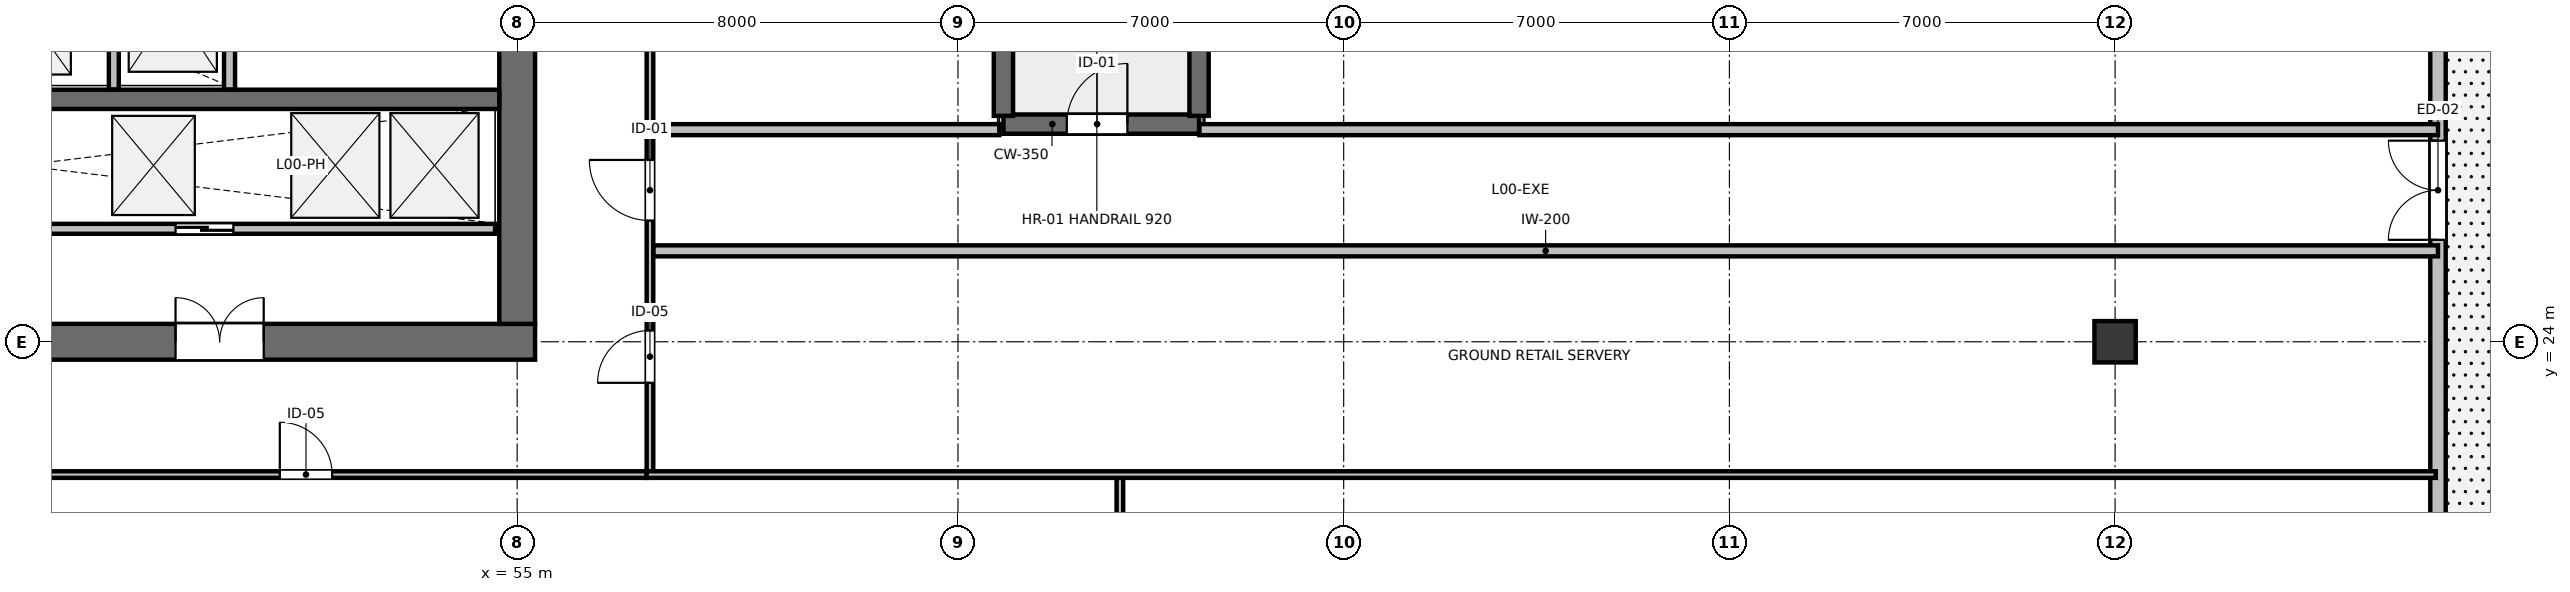
"""IFC4 building model, lengths in metres.
Left out: names, types, materials, properties, quantities, classifications, styles, units other than length and angle.
Written with IfcOpenShell. Run it as: python <this file> out.ifc"""

import sys

from ifc_helpers import new_model, si_unit, direction, frame, frame_2d, origin, origin_2d, place, context, subcontext, project, spatial, rectangle, extrude, element, fill, save


model = new_model("IFC4")
c1 = context("Model", 3, precision=1e-05, world=origin(), true_north=direction((0.0, 1.0)))
c2 = subcontext(c1, "Body", "Model", "MODEL_VIEW")
j1 = project(units=[si_unit("LENGTHUNIT", "METRE"), si_unit("PLANEANGLEUNIT", "RADIAN")], contexts=[c1])
p1 = place(None, origin())
s1 = spatial("IfcSite", under=j1, at=p1, CompositionType="ELEMENT")
p2 = place(p1, origin())
s2 = spatial("IfcBuilding", under=s1, at=p2, CompositionType="ELEMENT")
p3 = place(p2, origin())
s3 = spatial("IfcBuildingStorey", under=s2, at=p3, CompositionType="ELEMENT", Elevation=0.0)
p4 = place(p3, frame((36.675, 24.0, 0.0), z_axis=(0.0, 0.0, 1.0), x_axis=(1.0, 0.0, 0.0)))
e1 = element("IfcWall", 1, at=p4, inside=s3, PredefinedType="SHEAR", context=c2, shape_type="SweptSolid", body=[
    extrude(rectangle(XDim=18.65, YDim=0.65, at=frame_2d((9.325, 0.0))), origin(), (0.0, 0.0, 1.0), 4.72),
])
p5 = place(p4, frame((5.725, 0.0, 0.0)))
e2 = element("IfcOpeningElement", 2, at=p5, cuts=e1, PredefinedType="OPENING", context=c2, shape_type="SweptSolid", body=[
    extrude(rectangle(XDim=1.6, YDim=2.15, at=frame_2d((0.8, 1.075))), frame((0.0, 0.335, 0.0), z_axis=(0.0, -1.0, 0.0), x_axis=(1.0, 0.0, 0.0)), (0.0, 0.0, 1.0), 0.67),
])
p6 = place(p4, frame((12.125, 0.0, 0.0)))
e3 = element("IfcOpeningElement", 3, at=p6, cuts=e1, PredefinedType="OPENING", context=c2, shape_type="SweptSolid", body=[
    extrude(rectangle(XDim=1.6, YDim=2.15, at=frame_2d((0.8, 1.075))), frame((0.0, 0.335, 0.0), z_axis=(0.0, -1.0, 0.0), x_axis=(1.0, 0.0, 0.0)), (0.0, 0.0, 1.0), 0.67),
])
p7 = place(p3, frame((55.0, 24.325, 0.0), z_axis=(0.0, 0.0, 1.0), x_axis=(0.0, 1.0, 0.0)))
e4 = element("IfcWall", 4, at=p7, inside=s3, PredefinedType="SHEAR", context=c2, shape_type="SweptSolid", body=[
    extrude(rectangle(XDim=15.35, YDim=0.65, at=frame_2d((7.675, 0.0))), origin(), (0.0, 0.0, 1.0), 4.72),
])
p8 = place(p7, frame((5.2, 0.0, 0.0)))
e5 = element("IfcOpeningElement", 5, at=p8, cuts=e4, PredefinedType="OPENING", context=c2, shape_type="SweptSolid", body=[
    extrude(rectangle(XDim=1.15, YDim=2.15, at=frame_2d((0.575, 1.075))), frame((0.0, 0.335, 0.0), z_axis=(0.0, -1.0, 0.0), x_axis=(1.0, 0.0, 0.0)), (0.0, 0.0, 1.0), 0.67),
])
p9 = place(p3, frame((37.325, 28.4, 0.0), z_axis=(0.0, 0.0, 1.0), x_axis=(1.0, 0.0, 0.0)))
e6 = element("IfcWall", 6, at=p9, inside=s3, PredefinedType="SHEAR", context=c2, shape_type="SweptSolid", body=[
    extrude(rectangle(XDim=17.35, YDim=0.35, at=frame_2d((8.675, 0.0))), origin(), (0.0, 0.0, 1.0), 4.72),
])
p10 = place(p3, frame((89.86, 6.36, 0.0), z_axis=(0.0, 0.0, 1.0), x_axis=(0.0, 1.0, 0.0)))
e7 = element("IfcWall", 7, at=p10, inside=s3, PredefinedType="STANDARD", context=c2, shape_type="SweptSolid", body=[
    extrude(rectangle(XDim=51.28, YDim=0.28, at=frame_2d((25.64, 0.0))), origin(), (0.0, 0.0, 1.0), 4.72),
])
p11 = place(p10, frame((19.49, 0.0, 0.0)))
e8 = element("IfcOpeningElement", 8, at=p11, cuts=e7, PredefinedType="OPENING", context=c2, shape_type="SweptSolid", body=[
    extrude(rectangle(XDim=1.8, YDim=2.4, at=frame_2d((0.9, 1.2))), frame((0.0, 0.15, 0.0), z_axis=(0.0, -1.0, 0.0), x_axis=(1.0, 0.0, 0.0)), (0.0, 0.0, 1.0), 0.3),
])
p12 = place(p10, frame((37.19, 0.0, 0.0)))
e9 = element("IfcOpeningElement", 9, at=p12, cuts=e7, PredefinedType="OPENING", context=c2, shape_type="SweptSolid", body=[
    extrude(rectangle(XDim=3.6, YDim=3.6, at=frame_2d((1.8, 1.8))), frame((0.0, 0.15, 0.0), z_axis=(0.0, -1.0, 0.0), x_axis=(1.0, 0.0, 0.0)), (0.0, 0.0, 1.0), 0.3),
])
p13 = place(p10, frame((1.788, 0.0, 0.85)))
e10 = element("IfcOpeningElement", 10, at=p13, cuts=e7, PredefinedType="OPENING", context=c2, shape_type="SweptSolid", body=[
    extrude(rectangle(XDim=2.4, YDim=2.4, at=frame_2d((1.2, 1.2))), frame((0.0, 0.15, 0.0), z_axis=(0.0, -1.0, 0.0), x_axis=(1.0, 0.0, 0.0)), (0.0, 0.0, 1.0), 0.3),
])
p14 = place(p10, frame((5.563, 0.0, 0.85)))
e11 = element("IfcOpeningElement", 11, at=p14, cuts=e7, PredefinedType="OPENING", context=c2, shape_type="SweptSolid", body=[
    extrude(rectangle(XDim=2.4, YDim=2.4, at=frame_2d((1.2, 1.2))), frame((0.0, 0.15, 0.0), z_axis=(0.0, -1.0, 0.0), x_axis=(1.0, 0.0, 0.0)), (0.0, 0.0, 1.0), 0.3),
])
p15 = place(p10, frame((9.338, 0.0, 0.85)))
e12 = element("IfcOpeningElement", 12, at=p15, cuts=e7, PredefinedType="OPENING", context=c2, shape_type="SweptSolid", body=[
    extrude(rectangle(XDim=2.4, YDim=2.4, at=frame_2d((1.2, 1.2))), frame((0.0, 0.15, 0.0), z_axis=(0.0, -1.0, 0.0), x_axis=(1.0, 0.0, 0.0)), (0.0, 0.0, 1.0), 0.3),
])
p16 = place(p10, frame((43.317, 0.0, 0.85)))
e13 = element("IfcOpeningElement", 13, at=p16, cuts=e7, PredefinedType="OPENING", context=c2, shape_type="SweptSolid", body=[
    extrude(rectangle(XDim=2.4, YDim=2.4, at=frame_2d((1.2, 1.2))), frame((0.0, 0.15, 0.0), z_axis=(0.0, -1.0, 0.0), x_axis=(1.0, 0.0, 0.0)), (0.0, 0.0, 1.0), 0.3),
])
p17 = place(p10, frame((47.092, 0.0, 0.85)))
e14 = element("IfcOpeningElement", 14, at=p17, cuts=e7, PredefinedType="OPENING", context=c2, shape_type="SweptSolid", body=[
    extrude(rectangle(XDim=2.4, YDim=2.4, at=frame_2d((1.2, 1.2))), frame((0.0, 0.15, 0.0), z_axis=(0.0, -1.0, 0.0), x_axis=(1.0, 0.0, 0.0)), (0.0, 0.0, 1.0), 0.3),
])
p18 = place(p3, frame((49.78, 28.58, 0.0), z_axis=(0.0, 0.0, 1.0), x_axis=(0.0, 1.0, 0.0)))
e15 = element("IfcWall", 15, at=p18, inside=s3, PredefinedType="PARTITIONING", context=c2, shape_type="SweptSolid", body=[
    extrude(rectangle(XDim=3.04, YDim=0.2, at=frame_2d((1.52, 0.0))), origin(), (0.0, 0.0, 1.0), 4.72),
])
p19 = place(p18, frame((0.95, 0.0, 0.0)))
e16 = element("IfcOpeningElement", 16, at=p19, cuts=e15, PredefinedType="OPENING", context=c2, shape_type="SweptSolid", body=[
    extrude(rectangle(XDim=1.05, YDim=2.15, at=frame_2d((0.525, 1.075))), frame((0.0, 0.11, 0.0), z_axis=(0.0, -1.0, 0.0), x_axis=(1.0, 0.0, 0.0)), (0.0, 0.0, 1.0), 0.22),
])
p20 = place(p3, frame((47.68, 28.58, 0.0), z_axis=(0.0, 0.0, 1.0), x_axis=(0.0, 1.0, 0.0)))
e17 = element("IfcWall", 17, at=p20, inside=s3, PredefinedType="PARTITIONING", context=c2, shape_type="SweptSolid", body=[
    extrude(rectangle(XDim=3.04, YDim=0.18, at=frame_2d((1.52, 0.0))), origin(), (0.0, 0.0, 1.0), 4.72),
])
p21 = place(p3, frame((37.4, 26.05, 0.0), z_axis=(0.0, 0.0, 1.0), x_axis=(1.0, 0.0, 0.0)))
e18 = element("IfcWall", 18, at=p21, inside=s3, PredefinedType="PARTITIONING", context=c2, shape_type="SweptSolid", body=[
    extrude(rectangle(XDim=17.2, YDim=0.18, at=frame_2d((8.6, 0.0))), origin(), (0.0, 0.0, 1.0), 4.72),
])
p22 = place(p21, frame((1.1, 0.0, 0.0)))
e19 = element("IfcOpeningElement", 19, at=p22, cuts=e18, PredefinedType="OPENING", context=c2, shape_type="SweptSolid", body=[
    extrude(rectangle(XDim=1.05, YDim=2.15, at=frame_2d((0.525, 1.075))), frame((0.0, 0.1, 0.0), z_axis=(0.0, -1.0, 0.0), x_axis=(1.0, 0.0, 0.0)), (0.0, 0.0, 1.0), 0.2),
])
p23 = place(p21, frame((3.0, 0.0, 0.0)))
e20 = element("IfcOpeningElement", 20, at=p23, cuts=e18, PredefinedType="OPENING", context=c2, shape_type="SweptSolid", body=[
    extrude(rectangle(XDim=1.05, YDim=2.15, at=frame_2d((0.525, 1.075))), frame((0.0, 0.1, 0.0), z_axis=(0.0, -1.0, 0.0), x_axis=(1.0, 0.0, 0.0)), (0.0, 0.0, 1.0), 0.2),
])
p24 = place(p21, frame((11.4, 0.0, 0.0)))
e21 = element("IfcOpeningElement", 21, at=p24, cuts=e18, PredefinedType="OPENING", context=c2, shape_type="SweptSolid", body=[
    extrude(rectangle(XDim=1.05, YDim=2.15, at=frame_2d((0.525, 1.075))), frame((0.0, 0.1, 0.0), z_axis=(0.0, -1.0, 0.0), x_axis=(1.0, 0.0, 0.0)), (0.0, 0.0, 1.0), 0.2),
])
p25 = place(p3, frame((57.47, 25.65, 0.0), z_axis=(0.0, 0.0, 1.0), x_axis=(1.0, 0.0, 0.0)))
e22 = element("IfcWall", 22, at=p25, inside=s3, PredefinedType="PARTITIONING", context=c2, shape_type="SweptSolid", body=[
    extrude(rectangle(XDim=32.39, YDim=0.2, at=frame_2d((16.195, 0.0))), origin(), (0.0, 0.0, 1.0), 4.72),
])
p26 = place(p3, frame((57.47, 27.85, 0.0), z_axis=(0.0, 0.0, 1.0), x_axis=(1.0, 0.0, 0.0)))
e23 = element("IfcWall", 23, at=p26, inside=s3, PredefinedType="PARTITIONING", context=c2, shape_type="SweptSolid", body=[
    extrude(rectangle(XDim=6.28, YDim=0.2, at=frame_2d((3.14, 0.0))), origin(), (0.0, 0.0, 1.0), 4.72),
])
p27 = place(p3, frame((67.38, 27.85, 0.0), z_axis=(0.0, 0.0, 1.0), x_axis=(1.0, 0.0, 0.0)))
e24 = element("IfcWall", 24, at=p27, inside=s3, PredefinedType="PARTITIONING", context=c2, shape_type="SweptSolid", body=[
    extrude(rectangle(XDim=22.48, YDim=0.2, at=frame_2d((11.24, 0.0))), origin(), (0.0, 0.0, 1.0), 4.72),
])
p28 = place(p3, frame((65.938, 21.59, 0.0), z_axis=(0.0, 0.0, 1.0), x_axis=(0.0, -1.0, 0.0)))
e25 = element("IfcWall", 25, at=p28, inside=s3, PredefinedType="PARTITIONING", context=c2, shape_type="SweptSolid", body=[
    extrude(rectangle(XDim=19.41, YDim=0.12, at=frame_2d((9.705, 0.0))), origin(), (0.0, 0.0, 1.0), 3.82),
])
p29 = place(p28, frame((1.4, 0.0, 0.0)))
e26 = element("IfcOpeningElement", 26, at=p29, cuts=e25, PredefinedType="OPENING", context=c2, shape_type="SweptSolid", body=[
    extrude(rectangle(XDim=0.9, YDim=2.15, at=frame_2d((0.45, 1.075))), frame((0.0, 0.07, 0.0), z_axis=(0.0, -1.0, 0.0), x_axis=(1.0, 0.0, 0.0)), (0.0, 0.0, 1.0), 0.14),
])
p30 = place(p3, frame((34.65, 21.59, 0.0), z_axis=(0.0, 0.0, 1.0), x_axis=(1.0, 0.0, 0.0)))
e27 = element("IfcWall", 27, at=p30, inside=s3, PredefinedType="PARTITIONING", context=c2, shape_type="SweptSolid", body=[
    extrude(rectangle(XDim=22.7, YDim=0.12, at=frame_2d((11.35, 0.0))), origin(), (0.0, 0.0, 1.0), 3.82),
])
p31 = place(p30, frame((4.833, 0.0, 0.0)))
e28 = element("IfcOpeningElement", 28, at=p31, cuts=e27, PredefinedType="OPENING", context=c2, shape_type="SweptSolid", body=[
    extrude(rectangle(XDim=0.95, YDim=2.15, at=frame_2d((0.475, 1.075))), frame((0.0, 0.07, 0.0), z_axis=(0.0, -1.0, 0.0), x_axis=(1.0, 0.0, 0.0)), (0.0, 0.0, 1.0), 0.14),
])
p32 = place(p30, frame((16.042, 0.0, 0.0)))
e29 = element("IfcOpeningElement", 29, at=p32, cuts=e27, PredefinedType="OPENING", context=c2, shape_type="SweptSolid", body=[
    extrude(rectangle(XDim=0.95, YDim=2.15, at=frame_2d((0.475, 1.075))), frame((0.0, 0.07, 0.0), z_axis=(0.0, -1.0, 0.0), x_axis=(1.0, 0.0, 0.0)), (0.0, 0.0, 1.0), 0.14),
])
p33 = place(p3, frame((57.41, 21.65, 0.0), z_axis=(0.0, 0.0, 1.0), x_axis=(0.0, 1.0, 0.0)))
e30 = element("IfcWall", 30, at=p33, inside=s3, PredefinedType="PARTITIONING", context=c2, shape_type="SweptSolid", body=[
    extrude(rectangle(XDim=20.7, YDim=0.12, at=frame_2d((10.35, 0.0))), origin(), (0.0, 0.0, 1.0), 3.82),
])
p34 = place(p33, frame((1.605, 0.0, 0.0)))
e31 = element("IfcOpeningElement", 31, at=p34, cuts=e30, PredefinedType="OPENING", context=c2, shape_type="SweptSolid", body=[
    extrude(rectangle(XDim=0.95, YDim=2.15, at=frame_2d((0.475, 1.075))), frame((0.0, 0.07, 0.0), z_axis=(0.0, -1.0, 0.0), x_axis=(1.0, 0.0, 0.0)), (0.0, 0.0, 1.0), 0.14),
])
p35 = place(p33, frame((8.379, 0.0, 0.0)))
e32 = element("IfcOpeningElement", 32, at=p35, cuts=e30, PredefinedType="OPENING", context=c2, shape_type="SweptSolid", body=[
    extrude(rectangle(XDim=0.95, YDim=2.15, at=frame_2d((0.475, 1.075))), frame((0.0, 0.07, 0.0), z_axis=(0.0, -1.0, 0.0), x_axis=(1.0, 0.0, 0.0)), (0.0, 0.0, 1.0), 0.14),
])
p36 = place(p33, frame((15.459, 0.0, 0.0)))
e33 = element("IfcOpeningElement", 33, at=p36, cuts=e30, PredefinedType="OPENING", context=c2, shape_type="SweptSolid", body=[
    extrude(rectangle(XDim=0.95, YDim=2.15, at=frame_2d((0.475, 1.075))), frame((0.0, 0.07, 0.0), z_axis=(0.0, -1.0, 0.0), x_axis=(1.0, 0.0, 0.0)), (0.0, 0.0, 1.0), 0.14),
])
p37 = place(p33, frame((4.55, 0.0, 0.0)))
e34 = element("IfcOpeningElement", 34, at=p37, cuts=e30, PredefinedType="OPENING", context=c2, shape_type="SweptSolid", body=[
    extrude(rectangle(XDim=1.1, YDim=2.15, at=frame_2d((0.55, 1.075))), frame((0.0, 0.07, 0.0), z_axis=(0.0, -1.0, 0.0), x_axis=(1.0, 0.0, 0.0)), (0.0, 0.0, 1.0), 0.14),
])
p38 = place(p3, frame((57.35, 21.59, 0.0), z_axis=(0.0, 0.0, 1.0), x_axis=(1.0, 0.0, 0.0)))
e35 = element("IfcWall", 35, at=p38, inside=s3, PredefinedType="PARTITIONING", context=c2, shape_type="SweptSolid", body=[
    extrude(rectangle(XDim=32.47, YDim=0.12, at=frame_2d((16.235, 0.0))), origin(), (0.0, 0.0, 1.0), 3.82),
])
p39 = place(p3, frame((63.825, 27.95, 0.0), z_axis=(0.0, 0.0, 1.0), x_axis=(1.0, 0.0, 0.0)))
e36 = element("IfcWall", 36, at=p39, inside=s3, PredefinedType="SHEAR", context=c2, shape_type="SweptSolid", body=[
    extrude(rectangle(XDim=3.55, YDim=0.35, at=frame_2d((1.775, 0.0))), origin(), (0.0, 0.0, 1.0), 5.0),
])
p40 = place(p39, frame((1.15, 0.0, 0.0)))
e37 = element("IfcOpeningElement", 37, at=p40, cuts=e36, PredefinedType="OPENING", context=c2, shape_type="SweptSolid", body=[
    extrude(rectangle(XDim=1.1, YDim=2.15, at=frame_2d((0.55, 1.075))), frame((0.0, 0.185, 0.0), z_axis=(0.0, -1.0, 0.0), x_axis=(1.0, 0.0, 0.0)), (0.0, 0.0, 1.0), 0.37),
])
for number, where, z_axis, x_axis in (
    (38, (63.825, 28.1, 0.0), (0.0, 0.0, 1.0), (0.0, 1.0, 0.0)),
    (39, (67.375, 28.1, 0.0), (0.0, 0.0, 1.0), (0.0, 1.0, 0.0)),
):
    element("IfcWall", number, at=place(p3, frame(where, z_axis=z_axis, x_axis=x_axis)), inside=s3, PredefinedType="SHEAR", context=c2, shape_type="SweptSolid", body=[
        extrude(rectangle(XDim=7.7, YDim=0.35, at=frame_2d((3.85, 0.0))), origin(), (0.0, 0.0, 1.0), 5.0),
    ])
p41 = place(p3, frame((84.0, 24.0, 0.0), z_axis=(0.0, 0.0, 1.0), x_axis=(1.0, 0.0, 0.0)))
e40 = element("IfcColumn", 40, at=p41, inside=s3, PredefinedType="PILASTER", context=c2, shape_type="SweptSolid", body=[
    extrude(rectangle(XDim=0.75, YDim=0.75, at=origin_2d()), origin(), (0.0, 0.0, 1.0), 4.72),
])
p42 = place(p11, frame((1.8, 0.0, 0.0), z_axis=(0.0, 0.0, 1.0), x_axis=(-1.0, 0.0, 0.0)))
e41 = element("IfcDoor", 41, at=p42, inside=s3, OperationType="DOUBLE_DOOR_SINGLE_SWING", PredefinedType="DOOR", context=c2, shape_type="SweptSolid", body=[
    extrude(rectangle(XDim=1.8, YDim=2.4, at=frame_2d((0.9, 1.2))), frame((0.0, 0.025, 0.0), z_axis=(0.0, -1.0, 0.0), x_axis=(1.0, 0.0, 0.0)), (0.0, 0.0, 1.0), 0.05),
])
fill(e8, e41)
p43 = place(p6, origin())
e42 = element("IfcDoor", 42, at=p43, inside=s3, OperationType="DOUBLE_DOOR_SINGLE_SWING", PredefinedType="DOOR", context=c2, shape_type="SweptSolid", body=[
    extrude(rectangle(XDim=1.6, YDim=2.15, at=frame_2d((0.8, 1.075))), frame((0.0, 0.025, 0.0), z_axis=(0.0, -1.0, 0.0), x_axis=(1.0, 0.0, 0.0)), (0.0, 0.0, 1.0), 0.05),
])
fill(e3, e42)
p44 = place(p24, origin())
e43 = element("IfcDoor", 43, at=p44, inside=s3, OperationType="SLIDING_TO_LEFT", PredefinedType="DOOR", context=c2, shape_type="SweptSolid", body=[
    extrude(rectangle(XDim=1.05, YDim=2.15, at=frame_2d((0.525, 1.075))), frame((0.0, 0.025, 0.0), z_axis=(0.0, -1.0, 0.0), x_axis=(1.0, 0.0, 0.0)), (0.0, 0.0, 1.0), 0.05),
])
fill(e21, e43)
p45 = place(p32, origin())
e44 = element("IfcDoor", 44, at=p45, inside=s3, OperationType="SINGLE_SWING_LEFT", PredefinedType="DOOR", context=c2, shape_type="SweptSolid", body=[
    extrude(rectangle(XDim=0.95, YDim=2.15, at=frame_2d((0.475, 1.075))), frame((0.0, 0.025, 0.0), z_axis=(0.0, -1.0, 0.0), x_axis=(1.0, 0.0, 0.0)), (0.0, 0.0, 1.0), 0.05),
])
fill(e29, e44)
p46 = place(p34, origin())
e45 = element("IfcDoor", 45, at=p46, inside=s3, OperationType="SINGLE_SWING_LEFT", PredefinedType="DOOR", context=c2, shape_type="SweptSolid", body=[
    extrude(rectangle(XDim=0.95, YDim=2.15, at=frame_2d((0.475, 1.075))), frame((0.0, 0.025, 0.0), z_axis=(0.0, -1.0, 0.0), x_axis=(1.0, 0.0, 0.0)), (0.0, 0.0, 1.0), 0.05),
])
fill(e31, e45)
p47 = place(p37, origin())
e46 = element("IfcDoor", 46, at=p47, inside=s3, OperationType="SINGLE_SWING_RIGHT", PredefinedType="DOOR", context=c2, shape_type="SweptSolid", body=[
    extrude(rectangle(XDim=1.1, YDim=2.15, at=frame_2d((0.55, 1.075))), frame((0.0, 0.025, 0.0), z_axis=(0.0, -1.0, 0.0), x_axis=(1.0, 0.0, 0.0)), (0.0, 0.0, 1.0), 0.05),
])
fill(e34, e46)
p48 = place(p40, origin())
e47 = element("IfcDoor", 47, at=p48, inside=s3, OperationType="SINGLE_SWING_RIGHT", PredefinedType="DOOR", context=c2, shape_type="SweptSolid", body=[
    extrude(rectangle(XDim=1.1, YDim=2.15, at=frame_2d((0.55, 1.075))), frame((0.0, 0.025, 0.0), z_axis=(0.0, -1.0, 0.0), x_axis=(1.0, 0.0, 0.0)), (0.0, 0.0, 1.0), 0.05),
])
fill(e37, e47)
save(model, sys.argv[1])
